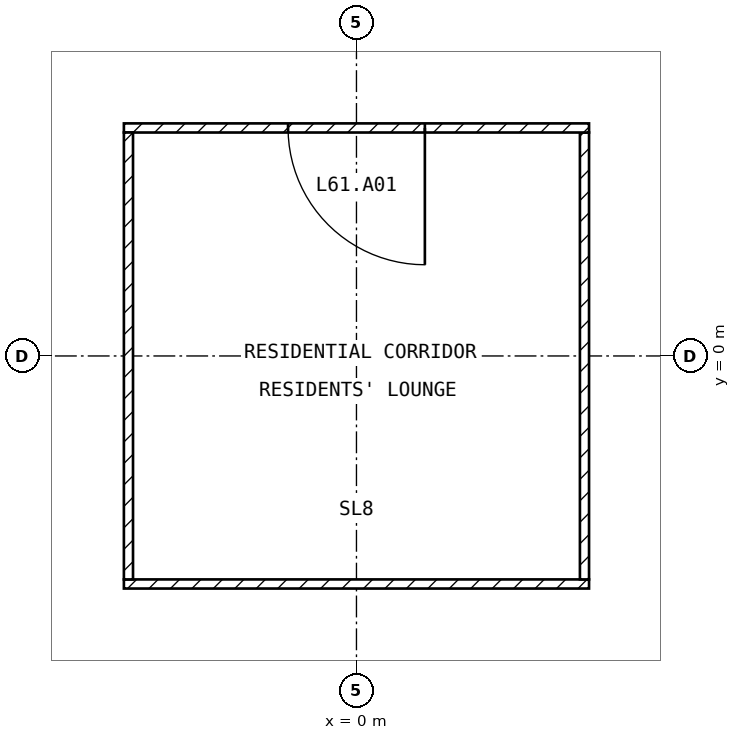
"""IFC4 building model, lengths in metres.
Left out: names, types, materials, properties, quantities, classifications, styles, units other than length and angle.
Written with IfcOpenShell. Run it as: python <this file> out.ifc"""

import sys

from ifc_helpers import new_model, si_unit, direction, frame, frame_2d, origin, place, context, subcontext, project, spatial, rectangle, extrude, element, fill, save


model = new_model("IFC4")
c1 = context("Model", 3, precision=1e-05, world=origin(), true_north=direction((0.0, 1.0)))
c2 = subcontext(c1, "Body", "Model", "MODEL_VIEW")
j1 = project(units=[si_unit("LENGTHUNIT", "METRE"), si_unit("PLANEANGLEUNIT", "RADIAN")], contexts=[c1])
p1 = place(None, origin())
s1 = spatial("IfcSite", under=j1, at=p1, CompositionType="ELEMENT")
p2 = place(p1, origin())
s2 = spatial("IfcBuilding", under=s1, at=p2, CompositionType="ELEMENT")
p3 = place(p2, frame((0.0, 0.0, 243.0)))
s3 = spatial("IfcBuildingStorey", under=s2, at=p3, CompositionType="ELEMENT", Elevation=243.0)
p4 = place(p3, frame((-3.06, -3.0, 0.0), z_axis=(0.0, 0.0, 1.0), x_axis=(1.0, 0.0, 0.0)))
e1 = element("IfcWall", 1, at=p4, inside=s3, PredefinedType="PARTITIONING", context=c2, shape_type="SweptSolid", body=[
    extrude(rectangle(XDim=6.12, YDim=0.12, at=frame_2d((3.06, 0.0))), origin(), (0.0, 0.0, 1.0), 3.25),
])
p5 = place(p3, frame((3.0, -2.94, 0.0), z_axis=(0.0, 0.0, 1.0), x_axis=(0.0, 1.0, 0.0)))
e2 = element("IfcWall", 2, at=p5, inside=s3, PredefinedType="PARTITIONING", context=c2, shape_type="SweptSolid", body=[
    extrude(rectangle(XDim=5.88, YDim=0.12, at=frame_2d((2.94, 0.0))), origin(), (0.0, 0.0, 1.0), 3.25),
])
p6 = place(p3, frame((3.06, 3.0, 0.0), z_axis=(0.0, 0.0, 1.0), x_axis=(-1.0, 0.0, 0.0)))
e3 = element("IfcWall", 3, at=p6, inside=s3, PredefinedType="PARTITIONING", context=c2, shape_type="SweptSolid", body=[
    extrude(rectangle(XDim=6.12, YDim=0.12, at=frame_2d((3.06, 0.0))), origin(), (0.0, 0.0, 1.0), 3.25),
])
p7 = place(p6, frame((2.16, 0.0, 0.0)))
e4 = element("IfcOpeningElement", 4, at=p7, cuts=e3, PredefinedType="OPENING", context=c2, shape_type="SweptSolid", body=[
    extrude(rectangle(XDim=1.8, YDim=2.1, at=frame_2d((0.9, 1.05))), frame((0.0, 0.07, 0.0), z_axis=(0.0, -1.0, 0.0), x_axis=(1.0, 0.0, 0.0)), (0.0, 0.0, 1.0), 0.14),
])
p8 = place(p3, frame((-3.0, 2.94, 0.0), z_axis=(0.0, 0.0, 1.0), x_axis=(0.0, -1.0, 0.0)))
e5 = element("IfcWall", 5, at=p8, inside=s3, PredefinedType="PARTITIONING", context=c2, shape_type="SweptSolid", body=[
    extrude(rectangle(XDim=5.88, YDim=0.12, at=frame_2d((2.94, 0.0))), origin(), (0.0, 0.0, 1.0), 3.25),
])
p9 = place(p7, origin())
e6 = element("IfcDoor", 6, at=p9, inside=s3, OperationType="SINGLE_SWING_LEFT", PredefinedType="DOOR", context=c2, shape_type="SweptSolid", body=[
    extrude(rectangle(XDim=1.8, YDim=2.1, at=frame_2d((0.9, 1.05))), frame((0.0, 0.025, 0.0), z_axis=(0.0, -1.0, 0.0), x_axis=(1.0, 0.0, 0.0)), (0.0, 0.0, 1.0), 0.05),
])
fill(e4, e6)
save(model, sys.argv[1])
